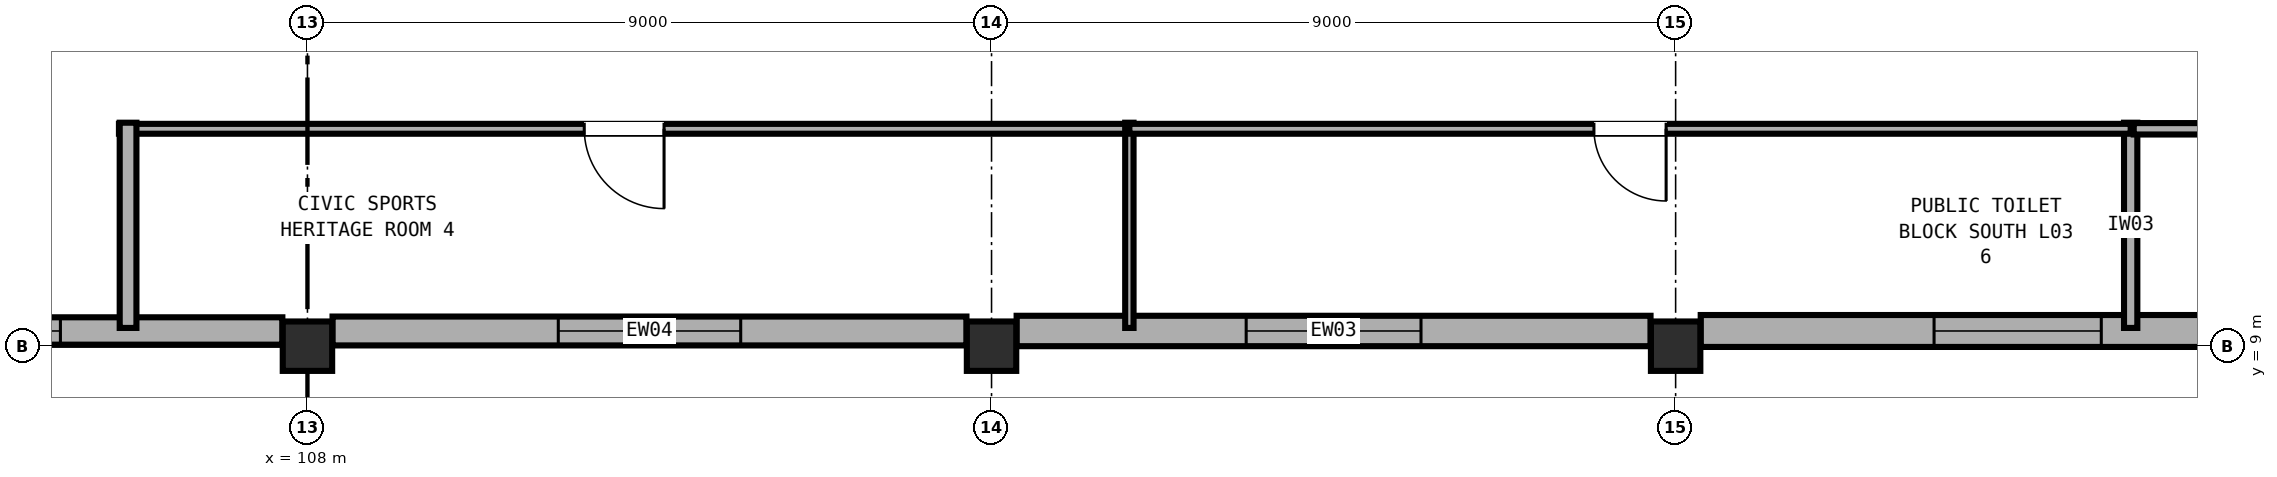
"""IFC4 building model, lengths in metres.
Left out: names, types, materials, properties, quantities, classifications, styles, units other than length and angle.
Written with IfcOpenShell. Run it as: python <this file> out.ifc"""

import sys

from ifc_helpers import new_model, si_unit, direction, frame, frame_2d, origin, origin_2d, place, context, subcontext, project, spatial, rectangle, extrude, element, fill, save


model = new_model("IFC4")
c1 = context("Model", 3, precision=1e-05, world=origin(), true_north=direction((0.0, 1.0)))
c2 = subcontext(c1, "Body", "Model", "MODEL_VIEW")
j1 = project(units=[si_unit("LENGTHUNIT", "METRE"), si_unit("PLANEANGLEUNIT", "RADIAN")], contexts=[c1])
p1 = place(None, origin())
s1 = spatial("IfcSite", under=j1, at=p1, CompositionType="ELEMENT")
p2 = place(p1, origin())
s2 = spatial("IfcBuilding", under=s1, at=p2, CompositionType="ELEMENT")
p3 = place(p2, frame((0.0, 0.0, 14.4)))
s3 = spatial("IfcBuildingStorey", under=s2, at=p3, CompositionType="ELEMENT", Elevation=14.4)
for number, where, z_axis, x_axis in (
    (1, (108.0, 9.0, 0.0), (0.0, 0.0, 1.0), (1.0, 0.0, 0.0)),
    (2, (117.0, 9.0, 0.0), (0.0, 0.0, 1.0), (1.0, 0.0, 0.0)),
    (3, (126.0, 9.0, 0.0), (0.0, 0.0, 1.0), (1.0, 0.0, 0.0)),
):
    element("IfcColumn", number, at=place(p3, frame(where, z_axis=z_axis, x_axis=x_axis)), inside=s3, PredefinedType="COLUMN", context=c2, shape_type="SweptSolid", body=[
        extrude(rectangle(XDim=0.65, YDim=0.65, at=origin_2d()), origin(), (0.0, 0.0, 1.0), 4.8),
    ])
p4 = place(p3, frame((134.67, 9.2, 0.0), z_axis=(0.0, 0.0, 1.0), x_axis=(-1.0, 0.0, 0.0)))
e4 = element("IfcWall", 4, at=p4, inside=s3, PredefinedType="SOLIDWALL", context=c2, shape_type="SweptSolid", body=[
    extrude(rectangle(XDim=8.34, YDim=0.42, at=frame_2d((4.17, 0.0))), origin(), (0.0, 0.0, 1.0), 3.58),
])
p5 = place(p4, frame((3.07, 0.0, 0.9)))
e5 = element("IfcOpeningElement", 5, at=p5, cuts=e4, PredefinedType="OPENING", context=c2, shape_type="SweptSolid", body=[
    extrude(rectangle(XDim=2.2, YDim=1.95, at=frame_2d((1.1, 0.975))), frame((0.0, 0.22, 0.0), z_axis=(0.0, -1.0, 0.0), x_axis=(1.0, 0.0, 0.0)), (0.0, 0.0, 1.0), 0.44),
])
p6 = place(p3, frame((125.67, 9.2, 0.0), z_axis=(0.0, 0.0, 1.0), x_axis=(-1.0, 0.0, 0.0)))
e6 = element("IfcWall", 6, at=p6, inside=s3, PredefinedType="SOLIDWALL", context=c2, shape_type="SweptSolid", body=[
    extrude(rectangle(XDim=8.34, YDim=0.4, at=frame_2d((4.17, 0.0))), origin(), (0.0, 0.0, 1.0), 3.58),
])
p7 = place(p6, frame((3.02, 0.0, 0.9)))
e7 = element("IfcOpeningElement", 7, at=p7, cuts=e6, PredefinedType="OPENING", context=c2, shape_type="SweptSolid", body=[
    extrude(rectangle(XDim=2.3, YDim=2.0, at=frame_2d((1.15, 1.0))), frame((0.0, 0.21, 0.0), z_axis=(0.0, -1.0, 0.0), x_axis=(1.0, 0.0, 0.0)), (0.0, 0.0, 1.0), 0.42),
])
p8 = place(p3, frame((116.67, 9.2, 0.0), z_axis=(0.0, 0.0, 1.0), x_axis=(-1.0, 0.0, 0.0)))
e8 = element("IfcWall", 8, at=p8, inside=s3, PredefinedType="SOLIDWALL", context=c2, shape_type="SweptSolid", body=[
    extrude(rectangle(XDim=8.34, YDim=0.38, at=frame_2d((4.17, 0.0))), origin(), (0.0, 0.0, 1.0), 3.58),
])
p9 = place(p8, frame((2.97, 0.0, 0.9)))
e9 = element("IfcOpeningElement", 9, at=p9, cuts=e8, PredefinedType="OPENING", context=c2, shape_type="SweptSolid", body=[
    extrude(rectangle(XDim=2.4, YDim=2.05, at=frame_2d((1.2, 1.025))), frame((0.0, 0.2, 0.0), z_axis=(0.0, -1.0, 0.0), x_axis=(1.0, 0.0, 0.0)), (0.0, 0.0, 1.0), 0.4),
])
p10 = place(p3, frame((107.67, 9.2, 0.0), z_axis=(0.0, 0.0, 1.0), x_axis=(-1.0, 0.0, 0.0)))
e10 = element("IfcWall", 10, at=p10, inside=s3, PredefinedType="SOLIDWALL", context=c2, shape_type="SweptSolid", body=[
    extrude(rectangle(XDim=8.34, YDim=0.36, at=frame_2d((4.17, 0.0))), origin(), (0.0, 0.0, 1.0), 3.58),
])
p11 = place(p10, frame((2.92, 0.0, 0.9)))
e11 = element("IfcOpeningElement", 11, at=p11, cuts=e10, PredefinedType="OPENING", context=c2, shape_type="SweptSolid", body=[
    extrude(rectangle(XDim=2.5, YDim=2.1, at=frame_2d((1.25, 1.05))), frame((0.0, 0.19, 0.0), z_axis=(0.0, -1.0, 0.0), x_axis=(1.0, 0.0, 0.0)), (0.0, 0.0, 1.0), 0.38),
])
p12 = place(p3, frame((118.813, 11.86, 0.0), z_axis=(0.0, 0.0, 1.0), x_axis=(-1.0, 0.0, 0.0)))
e12 = element("IfcWall", 12, at=p12, inside=s3, PredefinedType="PARTITIONING", context=c2, shape_type="SweptSolid", body=[
    extrude(rectangle(XDim=13.293, YDim=0.13, at=frame_2d((6.646, 0.0))), origin(), (0.0, 0.0, 1.0), 3.56),
])
p13 = place(p12, frame((6.122, 0.0, 0.0)))
e13 = element("IfcOpeningElement", 13, at=p13, cuts=e12, PredefinedType="OPENING", context=c2, shape_type="SweptSolid", body=[
    extrude(rectangle(XDim=1.05, YDim=2.1, at=frame_2d((0.525, 1.05))), frame((0.0, 0.075, 0.0), z_axis=(0.0, -1.0, 0.0), x_axis=(1.0, 0.0, 0.0)), (0.0, 0.0, 1.0), 0.15),
])
p14 = place(p3, frame((118.813, 11.94, 0.0), z_axis=(0.0, 0.0, 1.0), x_axis=(0.0, -1.0, 0.0)))
e14 = element("IfcWall", 14, at=p14, inside=s3, PredefinedType="PARTITIONING", context=c2, shape_type="SweptSolid", body=[
    extrude(rectangle(XDim=2.7, YDim=0.11, at=frame_2d((1.35, 0.0))), origin(), (0.0, 0.0, 1.0), 3.56),
])
p15 = place(p3, frame((105.64, 9.24, 0.0), z_axis=(0.0, 0.0, 1.0), x_axis=(0.0, 1.0, 0.0)))
e15 = element("IfcWall", 15, at=p15, inside=s3, PredefinedType="PARTITIONING", context=c2, shape_type="SweptSolid", body=[
    extrude(rectangle(XDim=2.7, YDim=0.22, at=frame_2d((1.35, 0.0))), origin(), (0.0, 0.0, 1.0), 3.56),
])
p16 = place(p3, frame((131.987, 9.24, 0.0), z_axis=(0.0, 0.0, 1.0), x_axis=(0.0, 1.0, 0.0)))
e16 = element("IfcWall", 16, at=p16, inside=s3, PredefinedType="PARTITIONING", context=c2, shape_type="SweptSolid", body=[
    extrude(rectangle(XDim=2.7, YDim=0.175, at=frame_2d((1.35, 0.0))), origin(), (0.0, 0.0, 1.0), 3.56),
])
p17 = place(p3, frame((132.027, 11.86, 0.0), z_axis=(0.0, 0.0, 1.0), x_axis=(1.0, 0.0, 0.0)))
e17 = element("IfcWall", 17, at=p17, inside=s3, PredefinedType="PARTITIONING", context=c2, shape_type="SweptSolid", body=[
    extrude(rectangle(XDim=13.213, YDim=0.15, at=frame_2d((6.607, 0.0))), origin(), (0.0, 0.0, 1.0), 3.56),
])
p18 = place(p3, frame((131.987, 11.86, 0.0), z_axis=(0.0, 0.0, 1.0), x_axis=(-1.0, 0.0, 0.0)))
e18 = element("IfcWall", 18, at=p18, inside=s3, PredefinedType="PARTITIONING", context=c2, shape_type="SweptSolid", body=[
    extrude(rectangle(XDim=13.174, YDim=0.13, at=frame_2d((6.587, 0.0))), origin(), (0.0, 0.0, 1.0), 3.56),
])
p19 = place(p18, frame((6.112, 0.0, 0.0)))
e19 = element("IfcOpeningElement", 19, at=p19, cuts=e18, PredefinedType="OPENING", context=c2, shape_type="SweptSolid", body=[
    extrude(rectangle(XDim=0.95, YDim=2.1, at=frame_2d((0.475, 1.05))), frame((0.0, 0.075, 0.0), z_axis=(0.0, -1.0, 0.0), x_axis=(1.0, 0.0, 0.0)), (0.0, 0.0, 1.0), 0.15),
])
p20 = place(p5, origin())
e20 = element("IfcWindow", 20, at=p20, inside=s3, PartitioningType="DOUBLE_PANEL_VERTICAL", PredefinedType="WINDOW", context=c2, shape_type="SweptSolid", body=[
    extrude(rectangle(XDim=2.2, YDim=1.95, at=frame_2d((1.1, 0.975))), frame((0.0, 0.03, 0.0), z_axis=(0.0, -1.0, 0.0), x_axis=(1.0, 0.0, 0.0)), (0.0, 0.0, 1.0), 0.06),
])
fill(e5, e20)
p21 = place(p7, origin())
e21 = element("IfcWindow", 21, at=p21, inside=s3, PartitioningType="DOUBLE_PANEL_VERTICAL", PredefinedType="WINDOW", context=c2, shape_type="SweptSolid", body=[
    extrude(rectangle(XDim=2.3, YDim=2.0, at=frame_2d((1.15, 1.0))), frame((0.0, 0.03, 0.0), z_axis=(0.0, -1.0, 0.0), x_axis=(1.0, 0.0, 0.0)), (0.0, 0.0, 1.0), 0.06),
])
fill(e7, e21)
p22 = place(p9, origin())
e22 = element("IfcWindow", 22, at=p22, inside=s3, PartitioningType="DOUBLE_PANEL_VERTICAL", PredefinedType="WINDOW", context=c2, shape_type="SweptSolid", body=[
    extrude(rectangle(XDim=2.4, YDim=2.05, at=frame_2d((1.2, 1.025))), frame((0.0, 0.03, 0.0), z_axis=(0.0, -1.0, 0.0), x_axis=(1.0, 0.0, 0.0)), (0.0, 0.0, 1.0), 0.06),
])
fill(e9, e22)
p23 = place(p11, origin())
e23 = element("IfcWindow", 23, at=p23, inside=s3, PartitioningType="DOUBLE_PANEL_VERTICAL", PredefinedType="WINDOW", context=c2, shape_type="SweptSolid", body=[
    extrude(rectangle(XDim=2.5, YDim=2.1, at=frame_2d((1.25, 1.05))), frame((0.0, 0.03, 0.0), z_axis=(0.0, -1.0, 0.0), x_axis=(1.0, 0.0, 0.0)), (0.0, 0.0, 1.0), 0.06),
])
fill(e11, e23)
p24 = place(p13, origin())
e24 = element("IfcDoor", 24, at=p24, inside=s3, OperationType="SINGLE_SWING_LEFT", PredefinedType="DOOR", context=c2, shape_type="SweptSolid", body=[
    extrude(rectangle(XDim=1.05, YDim=2.1, at=frame_2d((0.525, 1.05))), frame((0.0, 0.025, 0.0), z_axis=(0.0, -1.0, 0.0), x_axis=(1.0, 0.0, 0.0)), (0.0, 0.0, 1.0), 0.05),
])
fill(e13, e24)
p25 = place(p19, origin())
e25 = element("IfcDoor", 25, at=p25, inside=s3, OperationType="SINGLE_SWING_LEFT", PredefinedType="DOOR", context=c2, shape_type="SweptSolid", body=[
    extrude(rectangle(XDim=0.95, YDim=2.1, at=frame_2d((0.475, 1.05))), frame((0.0, 0.025, 0.0), z_axis=(0.0, -1.0, 0.0), x_axis=(1.0, 0.0, 0.0)), (0.0, 0.0, 1.0), 0.05),
])
fill(e19, e25)
save(model, sys.argv[1])
